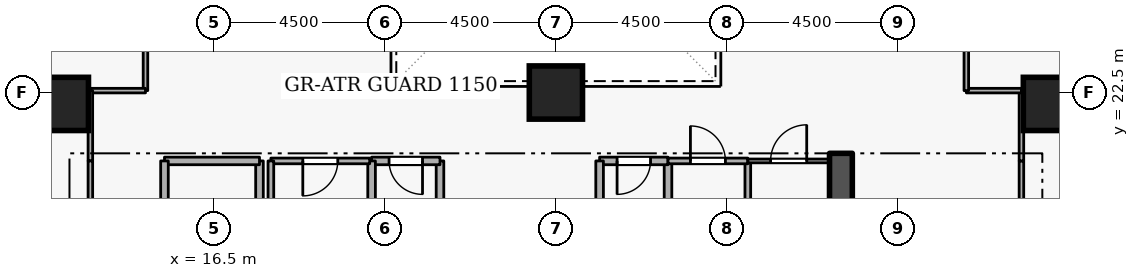
"""IFC4 building model, lengths in metres.
Left out: names, types, materials, properties, quantities, classifications, styles, units other than length and angle.
Written with IfcOpenShell. Run it as: python <this file> out.ifc"""

import sys

from ifc_helpers import new_model, si_unit, direction, frame, frame_2d, origin, origin_2d, place, context, subcontext, project, spatial, rectangle, extrude, element, fill, save


model = new_model("IFC4")
c1 = context("Model", 3, precision=1e-05, world=origin(), true_north=direction((0.0, 1.0)))
c2 = subcontext(c1, "Body", "Model", "MODEL_VIEW")
j1 = project(units=[si_unit("LENGTHUNIT", "METRE"), si_unit("PLANEANGLEUNIT", "RADIAN")], contexts=[c1])
p1 = place(None, origin())
s1 = spatial("IfcSite", under=j1, at=p1, CompositionType="ELEMENT")
p2 = place(p1, origin())
s2 = spatial("IfcBuilding", under=s1, at=p2, CompositionType="ELEMENT")
p3 = place(p2, frame((0.0, 0.0, 49.5)))
s3 = spatial("IfcBuildingStorey", under=s2, at=p3, CompositionType="ELEMENT", Elevation=49.5)
p4 = place(p3, frame((33.0, 15.2, 0.0), z_axis=(0.0, 0.0, 1.0), x_axis=(0.0, 1.0, 0.0)))
e1 = element("IfcWall", 1, at=p4, inside=s3, PredefinedType="SHEAR", context=c2, shape_type="SweptSolid", body=[
    extrude(rectangle(XDim=5.7, YDim=0.6, at=frame_2d((2.85, 0.0))), origin(), (0.0, 0.0, 1.0), 4.2),
])
for number, where, z_axis, x_axis in (
    (2, (12.5, 22.2, 0.0), (0.0, 0.0, 1.0), (1.0, 0.0, 0.0)),
    (3, (38.5, 22.2, 0.0), (0.0, 0.0, 1.0), (1.0, 0.0, 0.0)),
    (4, (25.5, 22.5, 0.0), (0.0, 0.0, 1.0), (1.0, 0.0, 0.0)),
):
    element("IfcColumn", number, at=place(p3, frame(where, z_axis=z_axis, x_axis=x_axis)), inside=s3, PredefinedType="COLUMN", context=c2, shape_type="SweptSolid", body=[
        extrude(rectangle(XDim=1.4, YDim=1.4, at=origin_2d()), origin(), (0.0, 0.0, 1.0), 4.2),
    ])
p5 = place(p3, frame((17.7, 18.4, 0.0), z_axis=(0.0, 0.0, 1.0), x_axis=(0.0, 1.0, 0.0)))
e5 = element("IfcWall", 5, at=p5, inside=s3, PredefinedType="STANDARD", context=c2, shape_type="SweptSolid", body=[
    extrude(rectangle(XDim=2.3, YDim=0.2, at=frame_2d((1.15, 0.0))), origin(), (0.0, 0.0, 1.0), 3.145),
])
p6 = place(p3, frame((17.7, 20.7, 0.0), z_axis=(0.0, 0.0, 1.0), x_axis=(-1.0, 0.0, 0.0)))
e6 = element("IfcWall", 6, at=p6, inside=s3, PredefinedType="STANDARD", context=c2, shape_type="SweptSolid", body=[
    extrude(rectangle(XDim=2.5, YDim=0.2, at=frame_2d((1.25, 0.0))), origin(), (0.0, 0.0, 1.0), 3.94),
])
p7 = place(p3, frame((15.2, 20.7, 0.0), z_axis=(0.0, 0.0, 1.0), x_axis=(0.0, -1.0, 0.0)))
e7 = element("IfcWall", 7, at=p7, inside=s3, PredefinedType="STANDARD", context=c2, shape_type="SweptSolid", body=[
    extrude(rectangle(XDim=5.7, YDim=0.2, at=frame_2d((2.85, 0.0))), origin(), (0.0, 0.0, 1.0), 3.94),
])
p8 = place(p7, frame((2.275, 0.0, 0.0)))
e8 = element("IfcOpeningElement", 8, at=p8, cuts=e7, PredefinedType="OPENING", context=c2, shape_type="SweptSolid", body=[
    extrude(rectangle(XDim=1.15, YDim=2.1, at=frame_2d((0.575, 1.05))), frame((0.0, 0.11, 0.0), z_axis=(0.0, -1.0, 0.0), x_axis=(1.0, 0.0, 0.0)), (0.0, 0.0, 1.0), 0.22),
])
p9 = place(p3, frame((28.45, 18.65, 0.0), z_axis=(0.0, 0.0, 1.0), x_axis=(0.0, 1.0, 0.0)))
e9 = element("IfcWall", 9, at=p9, inside=s3, PredefinedType="STANDARD", context=c2, shape_type="SweptSolid", body=[
    extrude(rectangle(XDim=2.05, YDim=0.2, at=frame_2d((1.025, 0.0))), origin(), (0.0, 0.0, 1.0), 3.94),
])
p10 = place(p3, frame((28.45, 20.7, 0.0), z_axis=(0.0, 0.0, 1.0), x_axis=(-1.0, 0.0, 0.0)))
e10 = element("IfcWall", 10, at=p10, inside=s3, PredefinedType="STANDARD", context=c2, shape_type="SweptSolid", body=[
    extrude(rectangle(XDim=1.8, YDim=0.2, at=frame_2d((0.9, 0.0))), origin(), (0.0, 0.0, 1.0), 3.94),
])
p11 = place(p10, frame((0.46, 0.0, 0.0)))
e11 = element("IfcOpeningElement", 11, at=p11, cuts=e10, PredefinedType="OPENING", context=c2, shape_type="SweptSolid", body=[
    extrude(rectangle(XDim=0.88, YDim=2.04, at=frame_2d((0.44, 1.02))), frame((0.0, 0.11, 0.0), z_axis=(0.0, -1.0, 0.0), x_axis=(1.0, 0.0, 0.0)), (0.0, 0.0, 1.0), 0.22),
])
for number, where, z_axis, x_axis in (
    (12, (26.65, 20.7, 0.0), (0.0, 0.0, 1.0), (0.0, -1.0, 0.0)),
    (13, (22.45, 18.65, 0.0), (0.0, 0.0, 1.0), (0.0, 1.0, 0.0)),
):
    element("IfcWall", number, at=place(p3, frame(where, z_axis=z_axis, x_axis=x_axis)), inside=s3, PredefinedType="STANDARD", context=c2, shape_type="SweptSolid", body=[
        extrude(rectangle(XDim=2.05, YDim=0.2, at=frame_2d((1.025, 0.0))), origin(), (0.0, 0.0, 1.0), 3.94),
    ])
p12 = place(p3, frame((22.45, 20.7, 0.0), z_axis=(0.0, 0.0, 1.0), x_axis=(-1.0, 0.0, 0.0)))
e14 = element("IfcWall", 14, at=p12, inside=s3, PredefinedType="STANDARD", context=c2, shape_type="SweptSolid", body=[
    extrude(rectangle(XDim=1.8, YDim=0.2, at=frame_2d((0.9, 0.0))), origin(), (0.0, 0.0, 1.0), 3.94),
])
p13 = place(p12, frame((0.46, 0.0, 0.0)))
e15 = element("IfcOpeningElement", 15, at=p13, cuts=e14, PredefinedType="OPENING", context=c2, shape_type="SweptSolid", body=[
    extrude(rectangle(XDim=0.88, YDim=2.04, at=frame_2d((0.44, 1.02))), frame((0.0, 0.11, 0.0), z_axis=(0.0, -1.0, 0.0), x_axis=(1.0, 0.0, 0.0)), (0.0, 0.0, 1.0), 0.22),
])
p14 = place(p3, frame((20.65, 20.7, 0.0), z_axis=(0.0, 0.0, 1.0), x_axis=(0.0, -1.0, 0.0)))
e16 = element("IfcWall", 16, at=p14, inside=s3, PredefinedType="STANDARD", context=c2, shape_type="SweptSolid", body=[
    extrude(rectangle(XDim=2.05, YDim=0.2, at=frame_2d((1.025, 0.0))), origin(), (0.0, 0.0, 1.0), 3.94),
])
p15 = place(p3, frame((20.6, 20.7, 0.0), z_axis=(0.0, 0.0, 1.0), x_axis=(-1.0, 0.0, 0.0)))
e17 = element("IfcWall", 17, at=p15, inside=s3, PredefinedType="PARTITIONING", context=c2, shape_type="SweptSolid", body=[
    extrude(rectangle(XDim=2.6, YDim=0.15, at=frame_2d((1.3, 0.0))), origin(), (0.0, 0.0, 1.0), 3.94),
])
p16 = place(p15, frame((0.84, 0.0, 0.0)))
e18 = element("IfcOpeningElement", 18, at=p16, cuts=e17, PredefinedType="OPENING", context=c2, shape_type="SweptSolid", body=[
    extrude(rectangle(XDim=0.92, YDim=2.08, at=frame_2d((0.46, 1.04))), frame((0.0, 0.085, 0.0), z_axis=(0.0, -1.0, 0.0), x_axis=(1.0, 0.0, 0.0)), (0.0, 0.0, 1.0), 0.17),
])
p17 = place(p3, frame((18.0, 20.7, 0.0), z_axis=(0.0, 0.0, 1.0), x_axis=(0.0, -1.0, 0.0)))
e19 = element("IfcWall", 19, at=p17, inside=s3, PredefinedType="PARTITIONING", context=c2, shape_type="SweptSolid", body=[
    extrude(rectangle(XDim=2.05, YDim=0.15, at=frame_2d((1.025, 0.0))), origin(), (0.0, 0.0, 1.0), 3.145),
])
p18 = place(p3, frame((30.55, 20.7, 0.0), z_axis=(0.0, 0.0, 1.0), x_axis=(0.0, -1.0, 0.0)))
e20 = element("IfcWall", 20, at=p18, inside=s3, PredefinedType="PARTITIONING", context=c2, shape_type="SweptSolid", body=[
    extrude(rectangle(XDim=2.05, YDim=0.15, at=frame_2d((1.025, 0.0))), origin(), (0.0, 0.0, 1.0), 3.94),
])
p19 = place(p3, frame((28.45, 20.7, 0.0), z_axis=(0.0, 0.0, 1.0), x_axis=(1.0, 0.0, 0.0)))
e21 = element("IfcWall", 21, at=p19, inside=s3, PredefinedType="PARTITIONING", context=c2, shape_type="SweptSolid", body=[
    extrude(rectangle(XDim=2.1, YDim=0.15, at=frame_2d((1.05, 0.0))), origin(), (0.0, 0.0, 1.0), 3.94),
])
p20 = place(p19, frame((0.59, 0.0, 0.0)))
e22 = element("IfcOpeningElement", 22, at=p20, cuts=e21, PredefinedType="OPENING", context=c2, shape_type="SweptSolid", body=[
    extrude(rectangle(XDim=0.92, YDim=2.08, at=frame_2d((0.46, 1.04))), frame((0.0, 0.085, 0.0), z_axis=(0.0, -1.0, 0.0), x_axis=(1.0, 0.0, 0.0)), (0.0, 0.0, 1.0), 0.17),
])
p21 = place(p3, frame((30.55, 20.7, 0.0), z_axis=(0.0, 0.0, 1.0), x_axis=(1.0, 0.0, 0.0)))
e23 = element("IfcWall", 23, at=p21, inside=s3, PredefinedType="PARTITIONING", context=c2, shape_type="SweptSolid", body=[
    extrude(rectangle(XDim=2.15, YDim=0.1, at=frame_2d((1.075, 0.0))), origin(), (0.0, 0.0, 1.0), 3.94),
])
p22 = place(p21, frame((0.6, 0.0, 0.0)))
e24 = element("IfcOpeningElement", 24, at=p22, cuts=e23, PredefinedType="OPENING", context=c2, shape_type="SweptSolid", body=[
    extrude(rectangle(XDim=0.95, YDim=2.1, at=frame_2d((0.475, 1.05))), frame((0.0, 0.06, 0.0), z_axis=(0.0, -1.0, 0.0), x_axis=(1.0, 0.0, 0.0)), (0.0, 0.0, 1.0), 0.12),
])
p23 = place(p3, frame((14.7, 27.0, 0.0), z_axis=(0.0, 0.0, 1.0), x_axis=(0.0, -1.0, 0.0)))
e25 = element("IfcWall", 25, at=p23, inside=s3, PredefinedType="PARTITIONING", context=c2, shape_type="SweptSolid", body=[
    extrude(rectangle(XDim=4.45, YDim=0.12, at=frame_2d((2.225, 0.0))), origin(), (0.0, 0.0, 1.0), 3.94),
])
p24 = place(p3, frame((14.7, 22.55, 0.0), z_axis=(0.0, 0.0, 1.0), x_axis=(-1.0, 0.0, 0.0)))
e26 = element("IfcWall", 26, at=p24, inside=s3, PredefinedType="PARTITIONING", context=c2, shape_type="SweptSolid", body=[
    extrude(rectangle(XDim=1.45, YDim=0.12, at=frame_2d((0.725, 0.0))), origin(), (0.0, 0.0, 1.0), 3.94),
])
p25 = place(p3, frame((13.25, 22.55, 0.0), z_axis=(0.0, 0.0, 1.0), x_axis=(0.0, -1.0, 0.0)))
e27 = element("IfcWall", 27, at=p25, inside=s3, PredefinedType="PARTITIONING", context=c2, shape_type="SweptSolid", body=[
    extrude(rectangle(XDim=1.85, YDim=0.12, at=frame_2d((0.925, 0.0))), origin(), (0.0, 0.0, 1.0), 3.94),
])
p26 = place(p3, frame((13.25, 20.7, 0.0), z_axis=(0.0, 0.0, 1.0), x_axis=(0.0, -1.0, 0.0)))
e28 = element("IfcWall", 28, at=p26, inside=s3, PredefinedType="PARTITIONING", context=c2, shape_type="SweptSolid", body=[
    extrude(rectangle(XDim=9.35, YDim=0.12, at=frame_2d((4.675, 0.0))), origin(), (0.0, 0.0, 1.0), 3.94),
])
p27 = place(p26, frame((4.15, 0.0, 0.0)))
e29 = element("IfcOpeningElement", 29, at=p27, cuts=e28, PredefinedType="OPENING", context=c2, shape_type="SweptSolid", body=[
    extrude(rectangle(XDim=1.05, YDim=2.1, at=frame_2d((0.525, 1.05))), frame((0.0, 0.07, 0.0), z_axis=(0.0, -1.0, 0.0), x_axis=(1.0, 0.0, 0.0)), (0.0, 0.0, 1.0), 0.14),
])
p28 = place(p3, frame((37.75, 17.55, 0.0), z_axis=(0.0, 0.0, 1.0), x_axis=(0.0, 1.0, 0.0)))
e30 = element("IfcWall", 30, at=p28, inside=s3, PredefinedType="PARTITIONING", context=c2, shape_type="SweptSolid", body=[
    extrude(rectangle(XDim=3.15, YDim=0.12, at=frame_2d((1.575, 0.0))), origin(), (0.0, 0.0, 1.0), 3.94),
])
p29 = place(p3, frame((37.75, 20.7, 0.0), z_axis=(0.0, 0.0, 1.0), x_axis=(0.0, 1.0, 0.0)))
e31 = element("IfcWall", 31, at=p29, inside=s3, PredefinedType="PARTITIONING", context=c2, shape_type="SweptSolid", body=[
    extrude(rectangle(XDim=1.85, YDim=0.12, at=frame_2d((0.925, 0.0))), origin(), (0.0, 0.0, 1.0), 3.94),
])
p30 = place(p3, frame((37.75, 22.55, 0.0), z_axis=(0.0, 0.0, 1.0), x_axis=(-1.0, 0.0, 0.0)))
e32 = element("IfcWall", 32, at=p30, inside=s3, PredefinedType="PARTITIONING", context=c2, shape_type="SweptSolid", body=[
    extrude(rectangle(XDim=1.45, YDim=0.12, at=frame_2d((0.725, 0.0))), origin(), (0.0, 0.0, 1.0), 3.94),
])
p31 = place(p3, frame((36.3, 22.55, 0.0), z_axis=(0.0, 0.0, 1.0), x_axis=(0.0, 1.0, 0.0)))
e33 = element("IfcWall", 33, at=p31, inside=s3, PredefinedType="PARTITIONING", context=c2, shape_type="SweptSolid", body=[
    extrude(rectangle(XDim=4.45, YDim=0.12, at=frame_2d((2.225, 0.0))), origin(), (0.0, 0.0, 1.0), 3.94),
])
p32 = place(p31, frame((1.7, 0.0, 0.0)))
e34 = element("IfcOpeningElement", 34, at=p32, cuts=e33, PredefinedType="OPENING", context=c2, shape_type="SweptSolid", body=[
    extrude(rectangle(XDim=1.05, YDim=2.1, at=frame_2d((0.525, 1.05))), frame((0.0, 0.07, 0.0), z_axis=(0.0, -1.0, 0.0), x_axis=(1.0, 0.0, 0.0)), (0.0, 0.0, 1.0), 0.14),
])
p33 = place(p11, origin())
e35 = element("IfcDoor", 35, at=p33, inside=s3, OperationType="SINGLE_SWING_RIGHT", PredefinedType="DOOR", context=c2, shape_type="SweptSolid", body=[
    extrude(rectangle(XDim=0.88, YDim=2.04, at=frame_2d((0.44, 1.02))), frame((0.0, 0.025, 0.0), z_axis=(0.0, -1.0, 0.0), x_axis=(1.0, 0.0, 0.0)), (0.0, 0.0, 1.0), 0.05),
])
fill(e11, e35)
p34 = place(p13, origin())
e36 = element("IfcDoor", 36, at=p34, inside=s3, OperationType="SINGLE_SWING_LEFT", PredefinedType="DOOR", context=c2, shape_type="SweptSolid", body=[
    extrude(rectangle(XDim=0.88, YDim=2.04, at=frame_2d((0.44, 1.02))), frame((0.0, 0.025, 0.0), z_axis=(0.0, -1.0, 0.0), x_axis=(1.0, 0.0, 0.0)), (0.0, 0.0, 1.0), 0.05),
])
fill(e15, e36)
p35 = place(p16, origin())
e37 = element("IfcDoor", 37, at=p35, inside=s3, OperationType="SINGLE_SWING_RIGHT", PredefinedType="DOOR", context=c2, shape_type="SweptSolid", body=[
    extrude(rectangle(XDim=0.92, YDim=2.08, at=frame_2d((0.46, 1.04))), frame((0.0, 0.025, 0.0), z_axis=(0.0, -1.0, 0.0), x_axis=(1.0, 0.0, 0.0)), (0.0, 0.0, 1.0), 0.05),
])
fill(e18, e37)
p36 = place(p20, origin())
e38 = element("IfcDoor", 38, at=p36, inside=s3, OperationType="SINGLE_SWING_LEFT", PredefinedType="DOOR", context=c2, shape_type="SweptSolid", body=[
    extrude(rectangle(XDim=0.92, YDim=2.08, at=frame_2d((0.46, 1.04))), frame((0.0, 0.025, 0.0), z_axis=(0.0, -1.0, 0.0), x_axis=(1.0, 0.0, 0.0)), (0.0, 0.0, 1.0), 0.05),
])
fill(e22, e38)
p37 = place(p22, origin())
e39 = element("IfcDoor", 39, at=p37, inside=s3, OperationType="SINGLE_SWING_RIGHT", PredefinedType="DOOR", context=c2, shape_type="SweptSolid", body=[
    extrude(rectangle(XDim=0.95, YDim=2.1, at=frame_2d((0.475, 1.05))), frame((0.0, 0.025, 0.0), z_axis=(0.0, -1.0, 0.0), x_axis=(1.0, 0.0, 0.0)), (0.0, 0.0, 1.0), 0.05),
])
fill(e24, e39)
save(model, sys.argv[1])
